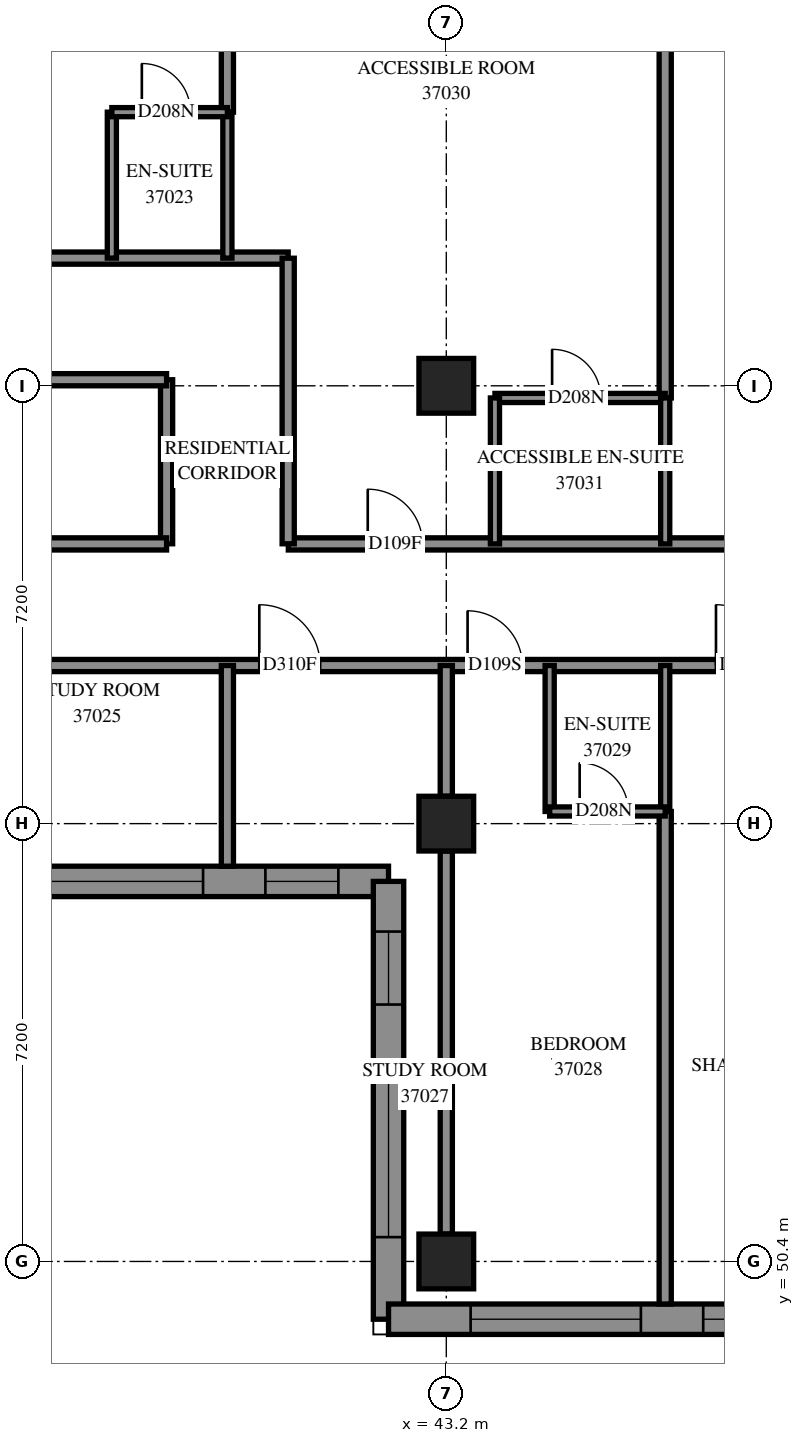
"""IFC4 building model, lengths in metres.
Left out: names, types, materials, properties, quantities, classifications, styles, units other than length and angle.
Written with IfcOpenShell. Run it as: python <this file> out.ifc"""

import sys

from ifc_helpers import new_model, si_unit, direction, frame, frame_2d, origin, origin_2d, place, context, subcontext, project, spatial, polyline, rectangle, outline, extrude, element, fill, save


model = new_model("IFC4")
c1 = context("Model", 3, precision=1e-05, world=origin(), true_north=direction((0.0, 1.0)))
c2 = subcontext(c1, "Body", "Model", "MODEL_VIEW")
j1 = project(units=[si_unit("LENGTHUNIT", "METRE"), si_unit("PLANEANGLEUNIT", "RADIAN")], contexts=[c1])
p1 = place(None, origin())
s1 = spatial("IfcSite", under=j1, at=p1, CompositionType="ELEMENT")
p2 = place(p1, origin())
s2 = spatial("IfcBuilding", under=s1, at=p2, CompositionType="ELEMENT")
p3 = place(p2, frame((0.0, 0.0, 138.8)))
s3 = spatial("IfcBuildingStorey", under=s2, at=p3, CompositionType="ELEMENT", Elevation=138.8)
for number, where, z_axis, x_axis in (
    (1, (43.2, 50.4, 0.0), (0.0, 0.0, 1.0), (1.0, 0.0, 0.0)),
    (2, (43.2, 57.6, 0.0), (0.0, 0.0, 1.0), (1.0, 0.0, 0.0)),
    (3, (43.2, 64.8, 0.0), (0.0, 0.0, 1.0), (1.0, 0.0, 0.0)),
):
    element("IfcColumn", number, at=place(p3, frame(where, z_axis=z_axis, x_axis=x_axis)), inside=s3, PredefinedType="COLUMN", context=c2, shape_type="SweptSolid", body=[
        extrude(rectangle(XDim=0.9, YDim=0.9, at=origin_2d()), origin(), (0.0, 0.0, 1.0), 3.1),
    ])
p4 = place(p3, frame((35.05, 56.65, 0.0), z_axis=(0.0, 0.0, 1.0), x_axis=(1.0, 0.0, 0.0)))
e4 = element("IfcWall", 4, at=p4, inside=s3, PredefinedType="SOLIDWALL", context=c2, shape_type="SweptSolid", body=[
    extrude(outline(polyline([(-0.25, -0.25), (6.95, -0.25), (7.45, 0.25), (0.25, 0.25), (-0.25, -0.25)])), origin(), (0.0, 0.0, 1.0), 3.1),
])
p5 = place(p4, frame((1.35, 0.0, 0.45)))
e5 = element("IfcOpeningElement", 5, at=p5, cuts=e4, PredefinedType="OPENING", context=c2, shape_type="SweptSolid", body=[
    extrude(rectangle(XDim=2.8, YDim=2.5, at=frame_2d((1.4, 1.25))), frame((0.0, 0.26, 0.0), z_axis=(0.0, -1.0, 0.0), x_axis=(1.0, 0.0, 0.0)), (0.0, 0.0, 1.0), 0.52),
])
p6 = place(p4, frame((5.175, 0.0, 0.45)))
e6 = element("IfcOpeningElement", 6, at=p6, cuts=e4, PredefinedType="OPENING", context=c2, shape_type="SweptSolid", body=[
    extrude(rectangle(XDim=1.2, YDim=2.5, at=frame_2d((0.6, 1.25))), frame((0.0, 0.26, 0.0), z_axis=(0.0, -1.0, 0.0), x_axis=(1.0, 0.0, 0.0)), (0.0, 0.0, 1.0), 0.52),
])
p7 = place(p3, frame((42.25, 56.65, 0.0), z_axis=(0.0, 0.0, 1.0), x_axis=(0.0, -1.0, 0.0)))
e7 = element("IfcWall", 7, at=p7, inside=s3, PredefinedType="SOLIDWALL", context=c2, shape_type="SweptSolid", body=[
    extrude(outline(polyline([(0.25, -0.25), (7.45, -0.25), (6.95, 0.25), (-0.25, 0.25), (0.25, -0.25)])), origin(), (0.0, 0.0, 1.0), 3.1),
])
p8 = place(p7, frame((3.05, 0.0, 0.45)))
e8 = element("IfcOpeningElement", 8, at=p8, cuts=e7, PredefinedType="OPENING", context=c2, shape_type="SweptSolid", body=[
    extrude(rectangle(XDim=2.8, YDim=2.5, at=frame_2d((1.4, 1.25))), frame((0.0, 0.26, 0.0), z_axis=(0.0, -1.0, 0.0), x_axis=(1.0, 0.0, 0.0)), (0.0, 0.0, 1.0), 0.52),
])
p9 = place(p7, frame((0.825, 0.0, 0.45)))
e9 = element("IfcOpeningElement", 9, at=p9, cuts=e7, PredefinedType="OPENING", context=c2, shape_type="SweptSolid", body=[
    extrude(rectangle(XDim=1.2, YDim=2.5, at=frame_2d((0.6, 1.25))), frame((0.0, 0.26, 0.0), z_axis=(0.0, -1.0, 0.0), x_axis=(1.0, 0.0, 0.0)), (0.0, 0.0, 1.0), 0.52),
])
p10 = place(p3, frame((42.25, 49.45, 0.0), z_axis=(0.0, 0.0, 1.0), x_axis=(1.0, 0.0, 0.0)))
e10 = element("IfcWall", 10, at=p10, inside=s3, PredefinedType="SOLIDWALL", context=c2, shape_type="SweptSolid", body=[
    extrude(outline(polyline([(-0.25, -0.25), (6.95, -0.25), (7.45, 0.25), (0.25, 0.25), (-0.25, -0.25)])), origin(), (0.0, 0.0, 1.0), 3.1),
])
p11 = place(p10, frame((1.35, 0.0, 0.45)))
e11 = element("IfcOpeningElement", 11, at=p11, cuts=e10, PredefinedType="OPENING", context=c2, shape_type="SweptSolid", body=[
    extrude(rectangle(XDim=2.8, YDim=2.5, at=frame_2d((1.4, 1.25))), frame((0.0, 0.26, 0.0), z_axis=(0.0, -1.0, 0.0), x_axis=(1.0, 0.0, 0.0)), (0.0, 0.0, 1.0), 0.52),
])
p12 = place(p10, frame((5.175, 0.0, 0.45)))
e12 = element("IfcOpeningElement", 12, at=p12, cuts=e10, PredefinedType="OPENING", context=c2, shape_type="SweptSolid", body=[
    extrude(rectangle(XDim=1.2, YDim=2.5, at=frame_2d((0.6, 1.25))), frame((0.0, 0.26, 0.0), z_axis=(0.0, -1.0, 0.0), x_axis=(1.0, 0.0, 0.0)), (0.0, 0.0, 1.0), 0.52),
])
p13 = place(p3, frame((21.6, 66.9, 0.0), z_axis=(0.0, 0.0, 1.0), x_axis=(1.0, 0.0, 0.0)))
e13 = element("IfcWall", 13, at=p13, inside=s3, PredefinedType="PARTITIONING", context=c2, shape_type="SweptSolid", body=[
    extrude(rectangle(XDim=19.0, YDim=0.2, at=frame_2d((9.5, 0.0))), origin(), (0.0, 0.0, 1.0), 3.1),
])
p14 = place(p13, frame((2.3, 0.0, 0.0)))
e14 = element("IfcOpeningElement", 14, at=p14, cuts=e13, PredefinedType="OPENING", context=c2, shape_type="SweptSolid", body=[
    extrude(rectangle(XDim=0.9, YDim=2.1, at=frame_2d((0.45, 1.05))), frame((0.0, 0.11, 0.0), z_axis=(0.0, -1.0, 0.0), x_axis=(1.0, 0.0, 0.0)), (0.0, 0.0, 1.0), 0.22),
])
p15 = place(p13, frame((5.957, 0.0, 0.0)))
e15 = element("IfcOpeningElement", 15, at=p15, cuts=e13, PredefinedType="OPENING", context=c2, shape_type="SweptSolid", body=[
    extrude(rectangle(XDim=0.9, YDim=2.1, at=frame_2d((0.45, 1.05))), frame((0.0, 0.11, 0.0), z_axis=(0.0, -1.0, 0.0), x_axis=(1.0, 0.0, 0.0)), (0.0, 0.0, 1.0), 0.22),
])
p16 = place(p13, frame((13.057, 0.0, 0.0)))
e16 = element("IfcOpeningElement", 16, at=p16, cuts=e13, PredefinedType="OPENING", context=c2, shape_type="SweptSolid", body=[
    extrude(rectangle(XDim=0.9, YDim=2.1, at=frame_2d((0.45, 1.05))), frame((0.0, 0.11, 0.0), z_axis=(0.0, -1.0, 0.0), x_axis=(1.0, 0.0, 0.0)), (0.0, 0.0, 1.0), 0.22),
])
p17 = place(p3, frame((36.0, 60.2, 0.0), z_axis=(0.0, 0.0, 1.0), x_axis=(1.0, 0.0, 0.0)))
e17 = element("IfcWall", 17, at=p17, inside=s3, PredefinedType="PARTITIONING", context=c2, shape_type="SweptSolid", body=[
    extrude(rectangle(XDim=17.0, YDim=0.2, at=frame_2d((8.5, 0.0))), origin(), (0.0, 0.0, 1.0), 3.1),
])
p18 = place(p17, frame((15.805, 0.0, 0.0)))
e18 = element("IfcOpeningElement", 18, at=p18, cuts=e17, PredefinedType="OPENING", context=c2, shape_type="SweptSolid", body=[
    extrude(rectangle(XDim=1.0, YDim=2.1, at=frame_2d((0.5, 1.05))), frame((0.0, 0.11, 0.0), z_axis=(0.0, -1.0, 0.0), x_axis=(1.0, 0.0, 0.0)), (0.0, 0.0, 1.0), 0.22),
])
p19 = place(p17, frame((4.125, 0.0, 0.0)))
e19 = element("IfcOpeningElement", 19, at=p19, cuts=e17, PredefinedType="OPENING", context=c2, shape_type="SweptSolid", body=[
    extrude(rectangle(XDim=1.0, YDim=2.1, at=frame_2d((0.5, 1.05))), frame((0.0, 0.11, 0.0), z_axis=(0.0, -1.0, 0.0), x_axis=(1.0, 0.0, 0.0)), (0.0, 0.0, 1.0), 0.22),
])
p20 = place(p17, frame((7.55, 0.0, 0.0)))
e20 = element("IfcOpeningElement", 20, at=p20, cuts=e17, PredefinedType="OPENING", context=c2, shape_type="SweptSolid", body=[
    extrude(rectangle(XDim=0.9, YDim=2.1, at=frame_2d((0.45, 1.05))), frame((0.0, 0.11, 0.0), z_axis=(0.0, -1.0, 0.0), x_axis=(1.0, 0.0, 0.0)), (0.0, 0.0, 1.0), 0.22),
])
p21 = place(p17, frame((11.635, 0.0, 0.0)))
e21 = element("IfcOpeningElement", 21, at=p21, cuts=e17, PredefinedType="OPENING", context=c2, shape_type="SweptSolid", body=[
    extrude(rectangle(XDim=1.0, YDim=2.1, at=frame_2d((0.5, 1.05))), frame((0.0, 0.11, 0.0), z_axis=(0.0, -1.0, 0.0), x_axis=(1.0, 0.0, 0.0)), (0.0, 0.0, 1.0), 0.22),
])
p22 = place(p3, frame((40.602, 62.2, 0.0), z_axis=(0.0, 0.0, 1.0), x_axis=(1.0, 0.0, 0.0)))
e22 = element("IfcWall", 22, at=p22, inside=s3, PredefinedType="PARTITIONING", context=c2, shape_type="SweptSolid", body=[
    extrude(rectangle(XDim=14.298, YDim=0.2, at=frame_2d((7.149, 0.0))), origin(), (0.0, 0.0, 1.0), 3.1),
])
p23 = place(p22, frame((1.306, 0.0, 0.0)))
e23 = element("IfcOpeningElement", 23, at=p23, cuts=e22, PredefinedType="OPENING", context=c2, shape_type="SweptSolid", body=[
    extrude(rectangle(XDim=0.9, YDim=2.1, at=frame_2d((0.45, 1.05))), frame((0.0, 0.11, 0.0), z_axis=(0.0, -1.0, 0.0), x_axis=(1.0, 0.0, 0.0)), (0.0, 0.0, 1.0), 0.22),
])
p24 = place(p22, frame((8.455, 0.0, 0.0)))
e24 = element("IfcOpeningElement", 24, at=p24, cuts=e22, PredefinedType="OPENING", context=c2, shape_type="SweptSolid", body=[
    extrude(rectangle(XDim=0.9, YDim=2.1, at=frame_2d((0.45, 1.05))), frame((0.0, 0.11, 0.0), z_axis=(0.0, -1.0, 0.0), x_axis=(1.0, 0.0, 0.0)), (0.0, 0.0, 1.0), 0.22),
])
p25 = place(p3, frame((46.8, 64.6, 0.0), z_axis=(0.0, 0.0, 1.0), x_axis=(0.0, 1.0, 0.0)))
e25 = element("IfcWall", 25, at=p25, inside=s3, PredefinedType="PARTITIONING", context=c2, shape_type="SweptSolid", body=[
    extrude(rectangle(XDim=8.169, YDim=0.2, at=frame_2d((4.085, 0.0))), origin(), (0.0, 0.0, 1.0), 3.1),
])
p26 = place(p3, frame((46.8, 49.7, 0.0), z_axis=(0.0, 0.0, 1.0), x_axis=(0.0, 1.0, 0.0)))
e26 = element("IfcWall", 26, at=p26, inside=s3, PredefinedType="PARTITIONING", context=c2, shape_type="SweptSolid", body=[
    extrude(rectangle(XDim=8.1, YDim=0.2, at=frame_2d((4.05, 0.0))), origin(), (0.0, 0.0, 1.0), 3.1),
])
p27 = place(p3, frame((43.2, 50.85, 0.0), z_axis=(0.0, 0.0, 1.0), x_axis=(0.0, 1.0, 0.0)))
e27 = element("IfcWall", 27, at=p27, inside=s3, PredefinedType="PARTITIONING", context=c2, shape_type="SweptSolid", body=[
    extrude(rectangle(XDim=6.3, YDim=0.2, at=frame_2d((3.15, 0.0))), origin(), (0.0, 0.0, 1.0), 2.6),
])
p28 = place(p3, frame((40.6, 62.202, 0.0), z_axis=(0.0, 0.0, 1.0), x_axis=(0.0, 1.0, 0.0)))
e28 = element("IfcWall", 28, at=p28, inside=s3, PredefinedType="PARTITIONING", context=c2, shape_type="SweptSolid", body=[
    extrude(rectangle(XDim=4.696, YDim=0.2, at=frame_2d((2.348, 0.0))), origin(), (0.0, 0.0, 1.0), 3.1),
])
p29 = place(p3, frame((39.6, 69.3, 0.0), z_axis=(0.0, 0.0, 1.0), x_axis=(0.0, 1.0, 0.0)))
e29 = element("IfcWall", 29, at=p29, inside=s3, PredefinedType="PARTITIONING", context=c2, shape_type="SweptSolid", body=[
    extrude(rectangle(XDim=3.502, YDim=0.2, at=frame_2d((1.751, 0.0))), origin(), (0.0, 0.0, 1.0), 3.1),
])
p30 = place(p3, frame((39.6, 56.9, 0.0), z_axis=(0.0, 0.0, 1.0), x_axis=(0.0, 1.0, 0.0)))
e30 = element("IfcWall", 30, at=p30, inside=s3, PredefinedType="PARTITIONING", context=c2, shape_type="SweptSolid", body=[
    extrude(rectangle(XDim=3.3, YDim=0.2, at=frame_2d((1.65, 0.0))), origin(), (0.0, 0.0, 1.0), 3.1),
])
p31 = place(p3, frame((44.0, 64.6, 0.0), z_axis=(0.0, 0.0, 1.0), x_axis=(1.0, 0.0, 0.0)))
e31 = element("IfcWall", 31, at=p31, inside=s3, PredefinedType="PARTITIONING", context=c2, shape_type="SweptSolid", body=[
    extrude(rectangle(XDim=2.8, YDim=0.15, at=frame_2d((1.4, 0.0))), origin(), (0.0, 0.0, 1.0), 3.1),
])
p32 = place(p31, frame((0.94, 0.0, 0.0)))
e32 = element("IfcOpeningElement", 32, at=p32, cuts=e31, PredefinedType="OPENING", context=c2, shape_type="SweptSolid", body=[
    extrude(rectangle(XDim=0.8, YDim=2.1, at=frame_2d((0.4, 1.05))), frame((0.0, 0.085, 0.0), z_axis=(0.0, -1.0, 0.0), x_axis=(1.0, 0.0, 0.0)), (0.0, 0.0, 1.0), 0.17),
])
p33 = place(p3, frame((38.6, 62.202, 0.0), z_axis=(0.0, 0.0, 1.0), x_axis=(0.0, 1.0, 0.0)))
e33 = element("IfcWall", 33, at=p33, inside=s3, PredefinedType="PARTITIONING", context=c2, shape_type="SweptSolid", body=[
    extrude(rectangle(XDim=2.698, YDim=0.2, at=frame_2d((1.349, 0.0))), origin(), (0.0, 0.0, 1.0), 3.1),
])
p34 = place(p3, frame((36.002, 62.2, 0.0), z_axis=(0.0, 0.0, 1.0), x_axis=(1.0, 0.0, 0.0)))
e34 = element("IfcWall", 34, at=p34, inside=s3, PredefinedType="PARTITIONING", context=c2, shape_type="SweptSolid", body=[
    extrude(rectangle(XDim=2.598, YDim=0.2, at=frame_2d((1.299, 0.0))), origin(), (0.0, 0.0, 1.0), 3.1),
])
for number, where, z_axis, x_axis in (
    (35, (44.9, 57.8, 0.0), (0.0, 0.0, 1.0), (0.0, 1.0, 0.0)),
    (36, (46.8, 57.8, 0.0), (0.0, 0.0, 1.0), (0.0, 1.0, 0.0)),
    (37, (37.7, 66.9, 0.0), (0.0, 0.0, 1.0), (0.0, 1.0, 0.0)),
    (38, (39.6, 66.9, 0.0), (0.0, 0.0, 1.0), (0.0, 1.0, 0.0)),
    (39, (44.0, 62.2, 0.0), (0.0, 0.0, 1.0), (0.0, 1.0, 0.0)),
    (40, (46.8, 62.2, 0.0), (0.0, 0.0, 1.0), (0.0, 1.0, 0.0)),
):
    element("IfcWall", number, at=place(p3, frame(where, z_axis=z_axis, x_axis=x_axis)), inside=s3, PredefinedType="PARTITIONING", context=c2, shape_type="SweptSolid", body=[
        extrude(rectangle(XDim=2.4, YDim=0.15, at=frame_2d((1.2, 0.0))), origin(), (0.0, 0.0, 1.0), 3.1),
    ])
for number, where, z_axis, x_axis in (
    (41, (43.2, 58.05, 0.0), (0.0, 0.0, 1.0), (0.0, 1.0, 0.0)),
    (42, (36.45, 64.9, 0.0), (0.0, 0.0, 1.0), (1.0, 0.0, 0.0)),
):
    element("IfcWall", number, at=place(p3, frame(where, z_axis=z_axis, x_axis=x_axis)), inside=s3, PredefinedType="PARTITIONING", context=c2, shape_type="SweptSolid", body=[
        extrude(rectangle(XDim=2.15, YDim=0.2, at=frame_2d((1.075, 0.0))), origin(), (0.0, 0.0, 1.0), 3.1),
    ])
p35 = place(p3, frame((37.7, 69.3, 0.0), z_axis=(0.0, 0.0, 1.0), x_axis=(1.0, 0.0, 0.0)))
e43 = element("IfcWall", 43, at=p35, inside=s3, PredefinedType="PARTITIONING", context=c2, shape_type="SweptSolid", body=[
    extrude(rectangle(XDim=1.9, YDim=0.15, at=frame_2d((0.95, 0.0))), origin(), (0.0, 0.0, 1.0), 3.1),
])
p36 = place(p35, frame((0.493, 0.0, 0.0)))
e44 = element("IfcOpeningElement", 44, at=p36, cuts=e43, PredefinedType="OPENING", context=c2, shape_type="SweptSolid", body=[
    extrude(rectangle(XDim=0.8, YDim=2.1, at=frame_2d((0.4, 1.05))), frame((0.0, 0.085, 0.0), z_axis=(0.0, -1.0, 0.0), x_axis=(1.0, 0.0, 0.0)), (0.0, 0.0, 1.0), 0.17),
])
p37 = place(p3, frame((44.9, 57.8, 0.0), z_axis=(0.0, 0.0, 1.0), x_axis=(1.0, 0.0, 0.0)))
e45 = element("IfcWall", 45, at=p37, inside=s3, PredefinedType="PARTITIONING", context=c2, shape_type="SweptSolid", body=[
    extrude(rectangle(XDim=1.9, YDim=0.15, at=frame_2d((0.95, 0.0))), origin(), (0.0, 0.0, 1.0), 3.1),
])
p38 = place(p37, frame((0.493, 0.0, 0.0)))
e46 = element("IfcOpeningElement", 46, at=p38, cuts=e45, PredefinedType="OPENING", context=c2, shape_type="SweptSolid", body=[
    extrude(rectangle(XDim=0.8, YDim=2.1, at=frame_2d((0.4, 1.05))), frame((0.0, 0.085, 0.0), z_axis=(0.0, -1.0, 0.0), x_axis=(1.0, 0.0, 0.0)), (0.0, 0.0, 1.0), 0.17),
])
p39 = place(p5, origin())
e47 = element("IfcWindow", 47, at=p39, inside=s3, PartitioningType="SINGLE_PANEL", PredefinedType="WINDOW", context=c2, shape_type="SweptSolid", body=[
    extrude(rectangle(XDim=2.8, YDim=2.5, at=frame_2d((1.4, 1.25))), frame((0.0, 0.18, 0.0), z_axis=(0.0, -1.0, 0.0), x_axis=(1.0, 0.0, 0.0)), (0.0, 0.0, 1.0), 0.06),
])
fill(e5, e47)
p40 = place(p6, origin())
e48 = element("IfcWindow", 48, at=p40, inside=s3, PartitioningType="SINGLE_PANEL", PredefinedType="WINDOW", context=c2, shape_type="SweptSolid", body=[
    extrude(rectangle(XDim=1.2, YDim=2.5, at=frame_2d((0.6, 1.25))), frame((0.0, 0.18, 0.0), z_axis=(0.0, -1.0, 0.0), x_axis=(1.0, 0.0, 0.0)), (0.0, 0.0, 1.0), 0.06),
])
fill(e6, e48)
p41 = place(p8, origin())
e49 = element("IfcWindow", 49, at=p41, inside=s3, PartitioningType="SINGLE_PANEL", PredefinedType="WINDOW", context=c2, shape_type="SweptSolid", body=[
    extrude(rectangle(XDim=2.8, YDim=2.5, at=frame_2d((1.4, 1.25))), frame((0.0, 0.18, 0.0), z_axis=(0.0, -1.0, 0.0), x_axis=(1.0, 0.0, 0.0)), (0.0, 0.0, 1.0), 0.06),
])
fill(e8, e49)
p42 = place(p9, origin())
e50 = element("IfcWindow", 50, at=p42, inside=s3, PartitioningType="SINGLE_PANEL", PredefinedType="WINDOW", context=c2, shape_type="SweptSolid", body=[
    extrude(rectangle(XDim=1.2, YDim=2.5, at=frame_2d((0.6, 1.25))), frame((0.0, 0.18, 0.0), z_axis=(0.0, -1.0, 0.0), x_axis=(1.0, 0.0, 0.0)), (0.0, 0.0, 1.0), 0.06),
])
fill(e9, e50)
p43 = place(p11, origin())
e51 = element("IfcWindow", 51, at=p43, inside=s3, PartitioningType="SINGLE_PANEL", PredefinedType="WINDOW", context=c2, shape_type="SweptSolid", body=[
    extrude(rectangle(XDim=2.8, YDim=2.5, at=frame_2d((1.4, 1.25))), frame((0.0, 0.18, 0.0), z_axis=(0.0, -1.0, 0.0), x_axis=(1.0, 0.0, 0.0)), (0.0, 0.0, 1.0), 0.06),
])
fill(e11, e51)
p44 = place(p12, origin())
e52 = element("IfcWindow", 52, at=p44, inside=s3, PartitioningType="SINGLE_PANEL", PredefinedType="WINDOW", context=c2, shape_type="SweptSolid", body=[
    extrude(rectangle(XDim=1.2, YDim=2.5, at=frame_2d((0.6, 1.25))), frame((0.0, 0.18, 0.0), z_axis=(0.0, -1.0, 0.0), x_axis=(1.0, 0.0, 0.0)), (0.0, 0.0, 1.0), 0.06),
])
fill(e12, e52)
p45 = place(p36, origin())
e53 = element("IfcDoor", 53, at=p45, inside=s3, OperationType="SINGLE_SWING_RIGHT", PredefinedType="DOOR", context=c2, shape_type="SweptSolid", body=[
    extrude(rectangle(XDim=0.8, YDim=2.1, at=frame_2d((0.4, 1.05))), frame((0.0, 0.025, 0.0), z_axis=(0.0, -1.0, 0.0), x_axis=(1.0, 0.0, 0.0)), (0.0, 0.0, 1.0), 0.05),
])
fill(e44, e53)
p46 = place(p19, origin())
e54 = element("IfcDoor", 54, at=p46, inside=s3, OperationType="SINGLE_SWING_RIGHT", PredefinedType="DOOR", context=c2, shape_type="SweptSolid", body=[
    extrude(rectangle(XDim=1.0, YDim=2.1, at=frame_2d((0.5, 1.05))), frame((0.0, 0.025, 0.0), z_axis=(0.0, -1.0, 0.0), x_axis=(1.0, 0.0, 0.0)), (0.0, 0.0, 1.0), 0.05),
])
fill(e19, e54)
p47 = place(p20, origin())
e55 = element("IfcDoor", 55, at=p47, inside=s3, OperationType="SINGLE_SWING_LEFT", PredefinedType="DOOR", context=c2, shape_type="SweptSolid", body=[
    extrude(rectangle(XDim=0.9, YDim=2.1, at=frame_2d((0.45, 1.05))), frame((0.0, 0.025, 0.0), z_axis=(0.0, -1.0, 0.0), x_axis=(1.0, 0.0, 0.0)), (0.0, 0.0, 1.0), 0.05),
])
fill(e20, e55)
p48 = place(p38, origin())
e56 = element("IfcDoor", 56, at=p48, inside=s3, OperationType="SINGLE_SWING_RIGHT", PredefinedType="DOOR", context=c2, shape_type="SweptSolid", body=[
    extrude(rectangle(XDim=0.8, YDim=2.1, at=frame_2d((0.4, 1.05))), frame((0.0, 0.025, 0.0), z_axis=(0.0, -1.0, 0.0), x_axis=(1.0, 0.0, 0.0)), (0.0, 0.0, 1.0), 0.05),
])
fill(e46, e56)
p49 = place(p23, origin())
e57 = element("IfcDoor", 57, at=p49, inside=s3, OperationType="SINGLE_SWING_LEFT", PredefinedType="DOOR", context=c2, shape_type="SweptSolid", body=[
    extrude(rectangle(XDim=0.9, YDim=2.1, at=frame_2d((0.45, 1.05))), frame((0.0, 0.025, 0.0), z_axis=(0.0, -1.0, 0.0), x_axis=(1.0, 0.0, 0.0)), (0.0, 0.0, 1.0), 0.05),
])
fill(e23, e57)
p50 = place(p32, origin())
e58 = element("IfcDoor", 58, at=p50, inside=s3, OperationType="SINGLE_SWING_RIGHT", PredefinedType="DOOR", context=c2, shape_type="SweptSolid", body=[
    extrude(rectangle(XDim=0.8, YDim=2.1, at=frame_2d((0.4, 1.05))), frame((0.0, 0.025, 0.0), z_axis=(0.0, -1.0, 0.0), x_axis=(1.0, 0.0, 0.0)), (0.0, 0.0, 1.0), 0.05),
])
fill(e32, e58)
p51 = place(p21, origin())
e59 = element("IfcDoor", 59, at=p51, inside=s3, OperationType="SINGLE_SWING_RIGHT", PredefinedType="DOOR", context=c2, shape_type="SweptSolid", body=[
    extrude(rectangle(XDim=1.0, YDim=2.1, at=frame_2d((0.5, 1.05))), frame((0.0, 0.025, 0.0), z_axis=(0.0, -1.0, 0.0), x_axis=(1.0, 0.0, 0.0)), (0.0, 0.0, 1.0), 0.05),
])
fill(e21, e59)
save(model, sys.argv[1])
